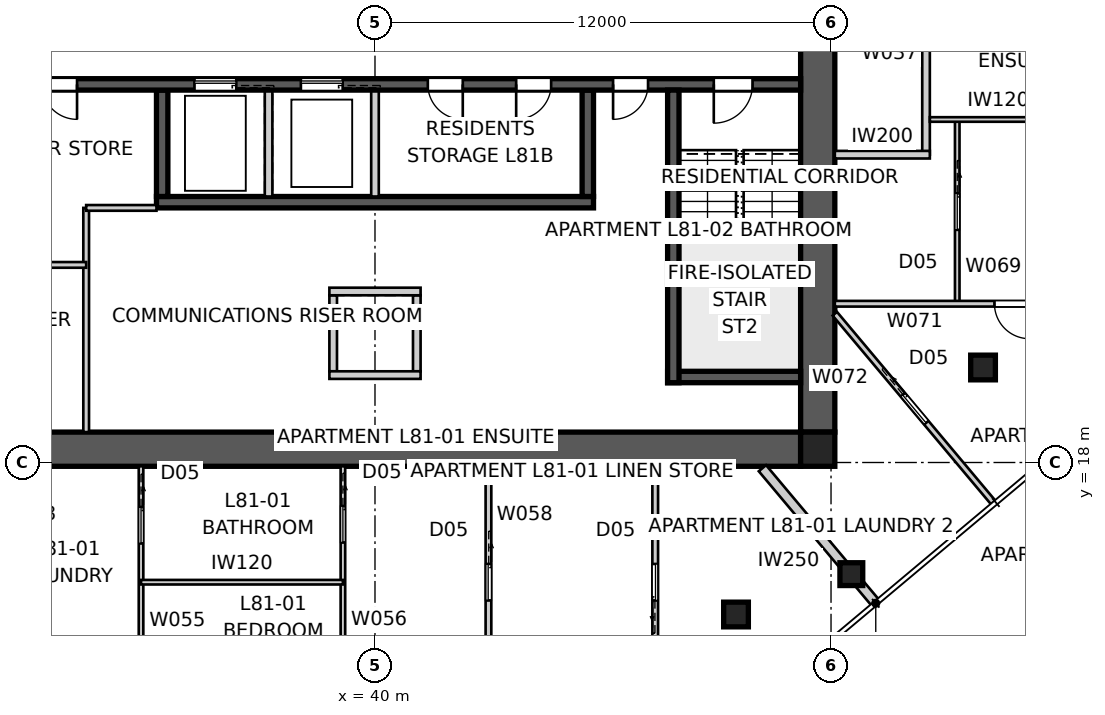
"""IFC4 building model, lengths in metres.
Left out: names, types, materials, properties, quantities, classifications, styles, units other than length and angle.
Written with IfcOpenShell. Run it as: python <this file> out.ifc"""

import sys

from ifc_helpers import new_model, si_unit, direction, frame, frame_2d, origin, origin_2d, place, context, subcontext, project, spatial, polyline, rectangle, outline, extrude, element, fill, save


model = new_model("IFC4")
c1 = context("Model", 3, precision=1e-05, world=origin(), true_north=direction((0.0, 1.0)))
c2 = subcontext(c1, "Body", "Model", "MODEL_VIEW")
j1 = project(units=[si_unit("LENGTHUNIT", "METRE"), si_unit("PLANEANGLEUNIT", "RADIAN")], contexts=[c1])
p1 = place(None, origin())
s1 = spatial("IfcSite", under=j1, at=p1, CompositionType="ELEMENT")
p2 = place(p1, origin())
s2 = spatial("IfcBuilding", under=s1, at=p2, CompositionType="ELEMENT")
p3 = place(p2, frame((0.0, 0.0, 293.0)))
s3 = spatial("IfcBuildingStorey", under=s2, at=p3, CompositionType="ELEMENT", Elevation=293.0)
p4 = place(p3, frame((51.2, 18.35, 0.0), z_axis=(0.0, 0.0, 1.0), x_axis=(-1.0, 0.0, 0.0)))
e1 = element("IfcWall", 1, at=p4, inside=s3, PredefinedType="SHEAR", context=c2, shape_type="SweptSolid", body=[
    extrude(outline(polyline([(0.0, -0.45), (22.4, -0.45), (22.4, -0.025), (22.85, -0.025), (22.85, 0.025), (22.4, 0.025), (22.4, 0.45), (0.0, 0.45), (0.0, 0.025), (-0.45, 0.025), (-0.45, -0.025), (0.0, -0.025), (0.0, -0.45)])), origin(), (0.0, 0.0, 1.0), 3.4),
])
p5 = place(p3, frame((51.65, 18.8, 0.0), z_axis=(0.0, 0.0, 1.0), x_axis=(0.0, 1.0, 0.0)))
e2 = element("IfcWall", 2, at=p5, inside=s3, PredefinedType="SHEAR", context=c2, shape_type="SweptSolid", body=[
    extrude(outline(polyline([(0.0, -0.45), (22.4, -0.45), (22.4, -0.025), (22.85, -0.025), (22.85, 0.025), (22.4, 0.025), (22.4, 0.45), (0.0, 0.45), (0.0, 0.025), (-0.45, 0.025), (-0.45, -0.025), (0.0, -0.025), (0.0, -0.45)])), origin(), (0.0, 0.0, 1.0), 3.4),
])
p6 = place(p5, frame((11.14, 0.0, 0.0)))
e3 = element("IfcOpeningElement", 3, at=p6, cuts=e2, PredefinedType="OPENING", context=c2, shape_type="SweptSolid", body=[
    extrude(rectangle(XDim=1.02, YDim=2.4, at=frame_2d((0.51, 1.2))), frame((0.0, 0.46, 0.0), z_axis=(0.0, -1.0, 0.0), x_axis=(1.0, 0.0, 0.0)), (0.0, 0.0, 1.0), 0.92),
])
p7 = place(p3, frame((51.2, 27.95, 0.0), z_axis=(0.0, 0.0, 1.0), x_axis=(-1.0, 0.0, 0.0)))
e4 = element("IfcWall", 4, at=p7, inside=s3, PredefinedType="SHEAR", context=c2, shape_type="SweptSolid", body=[
    extrude(rectangle(XDim=22.4, YDim=0.3, at=frame_2d((11.2, 0.0))), origin(), (0.0, 0.0, 1.0), 3.4),
])
p8 = place(p7, frame((19.04, 0.0, 0.0)))
e5 = element("IfcOpeningElement", 5, at=p8, cuts=e4, PredefinedType="OPENING", context=c2, shape_type="SweptSolid", body=[
    extrude(rectangle(XDim=0.92, YDim=2.1, at=frame_2d((0.46, 1.05))), frame((0.0, 0.16, 0.0), z_axis=(0.0, -1.0, 0.0), x_axis=(1.0, 0.0, 0.0)), (0.0, 0.0, 1.0), 0.32),
])
p9 = place(p7, frame((1.265, 0.0, 0.0)))
e6 = element("IfcOpeningElement", 6, at=p9, cuts=e4, PredefinedType="OPENING", context=c2, shape_type="SweptSolid", body=[
    extrude(rectangle(XDim=1.02, YDim=2.1, at=frame_2d((0.51, 1.05))), frame((0.0, 0.16, 0.0), z_axis=(0.0, -1.0, 0.0), x_axis=(1.0, 0.0, 0.0)), (0.0, 0.0, 1.0), 0.32),
])
p10 = place(p7, frame((4.015, 0.0, 0.0)))
e7 = element("IfcOpeningElement", 7, at=p10, cuts=e4, PredefinedType="OPENING", context=c2, shape_type="SweptSolid", body=[
    extrude(rectangle(XDim=0.92, YDim=2.1, at=frame_2d((0.46, 1.05))), frame((0.0, 0.16, 0.0), z_axis=(0.0, -1.0, 0.0), x_axis=(1.0, 0.0, 0.0)), (0.0, 0.0, 1.0), 0.32),
])
p11 = place(p7, frame((8.89, 0.0, 0.0)))
e8 = element("IfcOpeningElement", 8, at=p11, cuts=e4, PredefinedType="OPENING", context=c2, shape_type="SweptSolid", body=[
    extrude(rectangle(XDim=0.92, YDim=2.1, at=frame_2d((0.46, 1.05))), frame((0.0, 0.16, 0.0), z_axis=(0.0, -1.0, 0.0), x_axis=(1.0, 0.0, 0.0)), (0.0, 0.0, 1.0), 0.32),
])
p12 = place(p7, frame((6.565, 0.0, 0.0)))
e9 = element("IfcOpeningElement", 9, at=p12, cuts=e4, PredefinedType="OPENING", context=c2, shape_type="SweptSolid", body=[
    extrude(rectangle(XDim=0.92, YDim=2.1, at=frame_2d((0.46, 1.05))), frame((0.0, 0.16, 0.0), z_axis=(0.0, -1.0, 0.0), x_axis=(1.0, 0.0, 0.0)), (0.0, 0.0, 1.0), 0.32),
])
p13 = place(p7, frame((12.05, 0.0, 0.0)))
e10 = element("IfcOpeningElement", 10, at=p13, cuts=e4, PredefinedType="OPENING", context=c2, shape_type="SweptSolid", body=[
    extrude(rectangle(XDim=1.1, YDim=2.1, at=frame_2d((0.55, 1.05))), frame((0.0, 0.16, 0.0), z_axis=(0.0, -1.0, 0.0), x_axis=(1.0, 0.0, 0.0)), (0.0, 0.0, 1.0), 0.32),
])
p14 = place(p7, frame((14.85, 0.0, 0.0)))
e11 = element("IfcOpeningElement", 11, at=p14, cuts=e4, PredefinedType="OPENING", context=c2, shape_type="SweptSolid", body=[
    extrude(rectangle(XDim=1.1, YDim=2.1, at=frame_2d((0.55, 1.05))), frame((0.0, 0.16, 0.0), z_axis=(0.0, -1.0, 0.0), x_axis=(1.0, 0.0, 0.0)), (0.0, 0.0, 1.0), 0.32),
])
p15 = place(p3, frame((45.75, 24.85, 0.0), z_axis=(0.0, 0.0, 1.0), x_axis=(-1.0, 0.0, 0.0)))
e12 = element("IfcWall", 12, at=p15, inside=s3, PredefinedType="SHEAR", context=c2, shape_type="SweptSolid", body=[
    extrude(rectangle(XDim=11.5, YDim=0.3, at=frame_2d((5.75, 0.0))), origin(), (0.0, 0.0, 1.0), 3.4),
])
p16 = place(p3, frame((45.6, 27.8, 0.0), z_axis=(0.0, 0.0, 1.0), x_axis=(0.0, -1.0, 0.0)))
e13 = element("IfcWall", 13, at=p16, inside=s3, PredefinedType="SHEAR", context=c2, shape_type="SweptSolid", body=[
    extrude(rectangle(XDim=2.8, YDim=0.3, at=frame_2d((1.4, 0.0))), origin(), (0.0, 0.0, 1.0), 3.4),
])
for number, where, z_axis, x_axis in (
    (14, (40.0, 27.8, 0.0), (0.0, 0.0, 1.0), (0.0, -1.0, 0.0)),
    (15, (37.2, 27.8, 0.0), (0.0, 0.0, 1.0), (0.0, -1.0, 0.0)),
):
    element("IfcWall", number, at=place(p3, frame(where, z_axis=z_axis, x_axis=x_axis)), inside=s3, PredefinedType="SOLIDWALL", context=c2, shape_type="SweptSolid", body=[
        extrude(rectangle(XDim=2.8, YDim=0.2, at=frame_2d((1.4, 0.0))), origin(), (0.0, 0.0, 1.0), 3.4),
    ])
p17 = place(p3, frame((34.4, 27.8, 0.0), z_axis=(0.0, 0.0, 1.0), x_axis=(0.0, -1.0, 0.0)))
e16 = element("IfcWall", 16, at=p17, inside=s3, PredefinedType="SHEAR", context=c2, shape_type="SweptSolid", body=[
    extrude(rectangle(XDim=2.8, YDim=0.3, at=frame_2d((1.4, 0.0))), origin(), (0.0, 0.0, 1.0), 3.4),
])
p18 = place(p3, frame((47.85, 27.8, 0.0), z_axis=(0.0, 0.0, 1.0), x_axis=(0.0, -1.0, 0.0)))
e17 = element("IfcWall", 17, at=p18, inside=s3, PredefinedType="SHEAR", context=c2, shape_type="SweptSolid", body=[
    extrude(rectangle(XDim=7.7, YDim=0.3, at=frame_2d((3.85, 0.0))), origin(), (0.0, 0.0, 1.0), 3.4),
])
p19 = place(p3, frame((51.2, 20.25, 0.0), z_axis=(0.0, 0.0, 1.0), x_axis=(-1.0, 0.0, 0.0)))
e18 = element("IfcWall", 18, at=p19, inside=s3, PredefinedType="SHEAR", context=c2, shape_type="SweptSolid", body=[
    extrude(rectangle(XDim=3.5, YDim=0.3, at=frame_2d((1.75, 0.0))), origin(), (0.0, 0.0, 1.0), 3.4),
])
for number, where, z_axis, x_axis in (
    (19, (38.9, 22.4, 0.0), (0.0, 0.0, 1.0), (0.0, -1.0, 0.0)),
    (20, (41.1, 22.4, 0.0), (0.0, 0.0, 1.0), (0.0, -1.0, 0.0)),
):
    element("IfcWall", number, at=place(p3, frame(where, z_axis=z_axis, x_axis=x_axis)), inside=s3, PredefinedType="SOLIDWALL", context=c2, shape_type="SweptSolid", body=[
        extrude(rectangle(XDim=2.0, YDim=0.2, at=frame_2d((1.0, 0.0))), origin(), (0.0, 0.0, 1.0), 3.4),
    ])
for number, where, z_axis, x_axis in (
    (21, (38.8, 22.5, 0.0), (0.0, 0.0, 1.0), (1.0, 0.0, 0.0)),
    (22, (38.8, 20.3, 0.0), (0.0, 0.0, 1.0), (1.0, 0.0, 0.0)),
):
    element("IfcWall", number, at=place(p3, frame(where, z_axis=z_axis, x_axis=x_axis)), inside=s3, PredefinedType="SOLIDWALL", context=c2, shape_type="SweptSolid", body=[
        extrude(rectangle(XDim=2.4, YDim=0.2, at=frame_2d((1.2, 0.0))), origin(), (0.0, 0.0, 1.0), 3.4),
    ])
p20 = place(p3, frame((51.65, 18.35, 0.0), z_axis=(0.0, 0.0, 1.0), x_axis=(1.0, 0.0, 0.0)))
e23 = element("IfcColumn", 23, at=p20, inside=s3, PredefinedType="COLUMN", context=c2, shape_type="SweptSolid", body=[
    extrude(rectangle(XDim=0.9, YDim=0.9, at=origin_2d()), origin(), (0.0, 0.0, 1.0), 3.4),
])
p21 = place(p3, frame((52.534, 15.062, 0.0), z_axis=(0.0, 0.0, 1.0), x_axis=(1.0, 0.0, 0.0)))
e24 = element("IfcColumn", 24, at=p21, inside=s3, PredefinedType="COLUMN", context=c2, shape_type="SweptSolid", body=[
    extrude(rectangle(XDim=0.6, YDim=0.6, at=origin_2d()), origin(), (0.0, 0.0, 1.0), 3.4),
])
for number, where, z_axis, x_axis in (
    (25, (49.5, 14.0, 0.0), (0.0, 0.0, 1.0), (1.0, 0.0, 0.0)),
    (26, (56.0, 20.5, 0.0), (0.0, 0.0, 1.0), (1.0, 0.0, 0.0)),
):
    element("IfcColumn", number, at=place(p3, frame(where, z_axis=z_axis, x_axis=x_axis)), inside=s3, PredefinedType="COLUMN", context=c2, shape_type="SweptSolid", body=[
        extrude(rectangle(XDim=0.65, YDim=0.65, at=origin_2d()), origin(), (0.0, 0.0, 1.0), 3.4),
    ])
p22 = place(p3, frame((54.5, 26.1, 0.0), z_axis=(0.0, 0.0, 1.0), x_axis=(0.0, 1.0, 0.0)))
e27 = element("IfcWall", 27, at=p22, inside=s3, PredefinedType="PARTITIONING", context=c2, shape_type="SweptSolid", body=[
    extrude(rectangle(XDim=7.8, YDim=0.2, at=frame_2d((3.9, 0.0))), origin(), (0.0, 0.0, 1.0), 3.25),
])
p23 = place(p22, frame((5.302, 0.0, 0.0)))
e28 = element("IfcOpeningElement", 28, at=p23, cuts=e27, PredefinedType="OPENING", context=c2, shape_type="SweptSolid", body=[
    extrude(rectangle(XDim=1.02, YDim=2.34, at=frame_2d((0.51, 1.17))), frame((0.0, 0.11, 0.0), z_axis=(0.0, -1.0, 0.0), x_axis=(1.0, 0.0, 0.0)), (0.0, 0.0, 1.0), 0.22),
])
p24 = place(p3, frame((52.1, 26.1, 0.0), z_axis=(0.0, 0.0, 1.0), x_axis=(1.0, 0.0, 0.0)))
e29 = element("IfcWall", 29, at=p24, inside=s3, PredefinedType="PARTITIONING", context=c2, shape_type="SweptSolid", body=[
    extrude(rectangle(XDim=2.5, YDim=0.2, at=frame_2d((1.25, 0.0))), origin(), (0.0, 0.0, 1.0), 3.25),
])
p25 = place(p3, frame((53.177, 14.296, 0.0), z_axis=(0.0, 0.0, 1.0), x_axis=(-0.64279957712, 0.76603440109, 0.0)))
e30 = element("IfcWall", 30, at=p25, inside=s3, PredefinedType="PARTITIONING", context=c2, shape_type="SweptSolid", body=[
    extrude(rectangle(XDim=4.64, YDim=0.25, at=frame_2d((2.32, 0.0))), origin(), (0.0, 0.0, 1.0), 3.25),
])
p26 = place(p3, frame((32.4, 18.8, 0.0), z_axis=(0.0, 0.0, 1.0), x_axis=(0.0, 1.0, 0.0)))
e31 = element("IfcWall", 31, at=p26, inside=s3, PredefinedType="SOLIDWALL", context=c2, shape_type="SweptSolid", body=[
    extrude(rectangle(XDim=5.9, YDim=0.15, at=frame_2d((2.95, 0.0))), origin(), (0.0, 0.0, 1.0), 3.25),
])
p27 = place(p3, frame((32.4, 24.7, 0.0), z_axis=(0.0, 0.0, 1.0), x_axis=(1.0, 0.0, 0.0)))
e32 = element("IfcWall", 32, at=p27, inside=s3, PredefinedType="SOLIDWALL", context=c2, shape_type="SweptSolid", body=[
    extrude(rectangle(XDim=1.85, YDim=0.15, at=frame_2d((0.925, 0.0))), origin(), (0.0, 0.0, 1.0), 3.25),
])
p28 = place(p3, frame((32.4, 23.2, 0.0), z_axis=(0.0, 0.0, 1.0), x_axis=(-1.0, 0.0, 0.0)))
e33 = element("IfcWall", 33, at=p28, inside=s3, PredefinedType="SOLIDWALL", context=c2, shape_type="SweptSolid", body=[
    extrude(rectangle(XDim=3.6, YDim=0.15, at=frame_2d((1.8, 0.0))), origin(), (0.0, 0.0, 1.0), 3.25),
])
p29 = place(p28, frame((1.34, 0.0, 0.0)))
e34 = element("IfcOpeningElement", 34, at=p29, cuts=e33, PredefinedType="OPENING", context=c2, shape_type="SweptSolid", body=[
    extrude(rectangle(XDim=0.92, YDim=2.1, at=frame_2d((0.46, 1.05))), frame((0.0, 0.085, 0.0), z_axis=(0.0, -1.0, 0.0), x_axis=(1.0, 0.0, 0.0)), (0.0, 0.0, 1.0), 0.17),
])
p30 = place(p3, frame((33.844, 17.9, 0.0), z_axis=(0.0, 0.0, 1.0), x_axis=(0.0, -1.0, 0.0)))
e35 = element("IfcWall", 35, at=p30, inside=s3, PredefinedType="PARTITIONING", context=c2, shape_type="SweptSolid", body=[
    extrude(rectangle(XDim=6.1, YDim=0.12, at=frame_2d((3.05, 0.0))), origin(), (0.0, 0.0, 1.0), 3.25),
])
p31 = place(p30, frame((1.07, 0.0, 0.0)))
e36 = element("IfcOpeningElement", 36, at=p31, cuts=e35, PredefinedType="OPENING", context=c2, shape_type="SweptSolid", body=[
    extrude(rectangle(XDim=0.96, YDim=2.1, at=frame_2d((0.48, 1.05))), frame((0.0, 0.07, 0.0), z_axis=(0.0, -1.0, 0.0), x_axis=(1.0, 0.0, 0.0)), (0.0, 0.0, 1.0), 0.14),
])
p32 = place(p3, frame((39.156, 17.9, 0.0), z_axis=(0.0, 0.0, 1.0), x_axis=(0.0, -1.0, 0.0)))
e37 = element("IfcWall", 37, at=p32, inside=s3, PredefinedType="PARTITIONING", context=c2, shape_type="SweptSolid", body=[
    extrude(rectangle(XDim=6.1, YDim=0.12, at=frame_2d((3.05, 0.0))), origin(), (0.0, 0.0, 1.0), 3.25),
])
p33 = place(p32, frame((1.045, 0.0, 0.0)))
e38 = element("IfcOpeningElement", 38, at=p33, cuts=e37, PredefinedType="OPENING", context=c2, shape_type="SweptSolid", body=[
    extrude(rectangle(XDim=0.96, YDim=2.1, at=frame_2d((0.48, 1.05))), frame((0.0, 0.07, 0.0), z_axis=(0.0, -1.0, 0.0), x_axis=(1.0, 0.0, 0.0)), (0.0, 0.0, 1.0), 0.14),
])
p34 = place(p3, frame((39.156, 14.85, 0.0), z_axis=(0.0, 0.0, 1.0), x_axis=(-1.0, 0.0, 0.0)))
e39 = element("IfcWall", 39, at=p34, inside=s3, PredefinedType="PARTITIONING", context=c2, shape_type="SweptSolid", body=[
    extrude(rectangle(XDim=5.312, YDim=0.12, at=frame_2d((2.656, 0.0))), origin(), (0.0, 0.0, 1.0), 3.25),
])
p35 = place(p3, frame((42.986, 17.9, 0.0), z_axis=(0.0, 0.0, 1.0), x_axis=(0.0, -1.0, 0.0)))
e40 = element("IfcWall", 40, at=p35, inside=s3, PredefinedType="SOLIDWALL", context=c2, shape_type="SweptSolid", body=[
    extrude(rectangle(XDim=5.4, YDim=0.15, at=frame_2d((2.7, 0.0))), origin(), (0.0, 0.0, 1.0), 2.796),
])
p36 = place(p35, frame((2.57, 0.0, 0.0)))
e41 = element("IfcOpeningElement", 41, at=p36, cuts=e40, PredefinedType="OPENING", context=c2, shape_type="SweptSolid", body=[
    extrude(rectangle(XDim=0.96, YDim=2.1, at=frame_2d((0.48, 1.05))), frame((0.0, 0.085, 0.0), z_axis=(0.0, -1.0, 0.0), x_axis=(1.0, 0.0, 0.0)), (0.0, 0.0, 1.0), 0.17),
])
p37 = place(p3, frame((47.374, 11.8, 0.0), z_axis=(0.0, 0.0, 1.0), x_axis=(0.0, 1.0, 0.0)))
e42 = element("IfcWall", 42, at=p37, inside=s3, PredefinedType="SOLIDWALL", context=c2, shape_type="SweptSolid", body=[
    extrude(rectangle(XDim=6.1, YDim=0.15, at=frame_2d((3.05, 0.0))), origin(), (0.0, 0.0, 1.0), 3.25),
])
p38 = place(p37, frame((2.57, 0.0, 0.0)))
e43 = element("IfcOpeningElement", 43, at=p38, cuts=e42, PredefinedType="OPENING", context=c2, shape_type="SweptSolid", body=[
    extrude(rectangle(XDim=0.96, YDim=2.1, at=frame_2d((0.48, 1.05))), frame((0.0, 0.085, 0.0), z_axis=(0.0, -1.0, 0.0), x_axis=(1.0, 0.0, 0.0)), (0.0, 0.0, 1.0), 0.17),
])
p39 = place(p3, frame((55.321, 27.027, 0.0), z_axis=(0.0, 0.0, 1.0), x_axis=(0.0, -1.0, 0.0)))
e44 = element("IfcWall", 44, at=p39, inside=s3, PredefinedType="PARTITIONING", context=c2, shape_type="SweptSolid", body=[
    extrude(rectangle(XDim=4.849, YDim=0.12, at=frame_2d((2.424, 0.0))), origin(), (0.0, 0.0, 1.0), 3.25),
])
p40 = place(p39, frame((1.944, 0.0, 0.0)))
e45 = element("IfcOpeningElement", 45, at=p40, cuts=e44, PredefinedType="OPENING", context=c2, shape_type="SweptSolid", body=[
    extrude(rectangle(XDim=0.96, YDim=2.1, at=frame_2d((0.48, 1.05))), frame((0.0, 0.07, 0.0), z_axis=(0.0, -1.0, 0.0), x_axis=(1.0, 0.0, 0.0)), (0.0, 0.0, 1.0), 0.14),
])
p41 = place(p3, frame((54.6, 27.027, 0.0), z_axis=(0.0, 0.0, 1.0), x_axis=(1.0, 0.0, 0.0)))
e46 = element("IfcWall", 46, at=p41, inside=s3, PredefinedType="PARTITIONING", context=c2, shape_type="SweptSolid", body=[
    extrude(rectangle(XDim=3.6, YDim=0.12, at=frame_2d((1.8, 0.0))), origin(), (0.0, 0.0, 1.0), 2.796),
])
p42 = place(p3, frame((58.2, 22.178, 0.0), z_axis=(0.0, 0.0, 1.0), x_axis=(-1.0, 0.0, 0.0)))
e47 = element("IfcWall", 47, at=p42, inside=s3, PredefinedType="SOLIDWALL", context=c2, shape_type="SweptSolid", body=[
    extrude(rectangle(XDim=6.1, YDim=0.15, at=frame_2d((3.05, 0.0))), origin(), (0.0, 0.0, 1.0), 3.25),
])
p43 = place(p42, frame((0.979, 0.0, 0.0)))
e48 = element("IfcOpeningElement", 48, at=p43, cuts=e47, PredefinedType="OPENING", context=c2, shape_type="SweptSolid", body=[
    extrude(rectangle(XDim=0.92, YDim=2.34, at=frame_2d((0.46, 1.17))), frame((0.0, 0.085, 0.0), z_axis=(0.0, -1.0, 0.0), x_axis=(1.0, 0.0, 0.0)), (0.0, 0.0, 1.0), 0.17),
])
p44 = place(p3, frame((52.1, 21.915, 0.0), z_axis=(0.0, 0.0, 1.0), x_axis=(0.642782544614, -0.766048693191, 0.0)))
e49 = element("IfcWall", 49, at=p44, inside=s3, PredefinedType="SOLIDWALL", context=c2, shape_type="SweptSolid", body=[
    extrude(rectangle(XDim=6.489, YDim=0.15, at=frame_2d((3.244, 0.0))), origin(), (0.0, 0.0, 1.0), 3.25),
])
p45 = place(p44, frame((2.784, 0.0, 0.0)))
e50 = element("IfcOpeningElement", 50, at=p45, cuts=e49, PredefinedType="OPENING", context=c2, shape_type="SweptSolid", body=[
    extrude(rectangle(XDim=0.96, YDim=2.1, at=frame_2d((0.48, 1.05))), frame((0.0, 0.085, 0.0), z_axis=(0.0, -1.0, 0.0), x_axis=(1.0, 0.0, 0.0)), (0.0, 0.0, 1.0), 0.17),
])
p46 = place(p8, origin())
e51 = element("IfcDoor", 51, at=p46, inside=s3, OperationType="SINGLE_SWING_LEFT", PredefinedType="DOOR", context=c2, shape_type="SweptSolid", body=[
    extrude(rectangle(XDim=0.92, YDim=2.1, at=frame_2d((0.46, 1.05))), frame((0.0, 0.025, 0.0), z_axis=(0.0, -1.0, 0.0), x_axis=(1.0, 0.0, 0.0)), (0.0, 0.0, 1.0), 0.05),
])
fill(e5, e51)
p47 = place(p9, origin())
e52 = element("IfcDoor", 52, at=p47, inside=s3, OperationType="SINGLE_SWING_RIGHT", PredefinedType="DOOR", context=c2, shape_type="SweptSolid", body=[
    extrude(rectangle(XDim=1.02, YDim=2.1, at=frame_2d((0.51, 1.05))), frame((0.0, 0.025, 0.0), z_axis=(0.0, -1.0, 0.0), x_axis=(1.0, 0.0, 0.0)), (0.0, 0.0, 1.0), 0.05),
])
fill(e6, e52)
p48 = place(p10, origin())
e53 = element("IfcDoor", 53, at=p48, inside=s3, OperationType="SINGLE_SWING_RIGHT", PredefinedType="DOOR", context=c2, shape_type="SweptSolid", body=[
    extrude(rectangle(XDim=0.92, YDim=2.1, at=frame_2d((0.46, 1.05))), frame((0.0, 0.025, 0.0), z_axis=(0.0, -1.0, 0.0), x_axis=(1.0, 0.0, 0.0)), (0.0, 0.0, 1.0), 0.05),
])
fill(e7, e53)
p49 = place(p40, origin())
e54 = element("IfcDoor", 54, at=p49, inside=s3, OperationType="SLIDING_TO_LEFT", PredefinedType="DOOR", context=c2, shape_type="SweptSolid", body=[
    extrude(rectangle(XDim=0.96, YDim=2.1, at=frame_2d((0.48, 1.05))), frame((0.0, 0.025, 0.0), z_axis=(0.0, -1.0, 0.0), x_axis=(1.0, 0.0, 0.0)), (0.0, 0.0, 1.0), 0.05),
])
fill(e45, e54)
p50 = place(p43, origin())
e55 = element("IfcDoor", 55, at=p50, inside=s3, OperationType="SINGLE_SWING_LEFT", PredefinedType="DOOR", context=c2, shape_type="SweptSolid", body=[
    extrude(rectangle(XDim=0.92, YDim=2.34, at=frame_2d((0.46, 1.17))), frame((0.0, 0.025, 0.0), z_axis=(0.0, -1.0, 0.0), x_axis=(1.0, 0.0, 0.0)), (0.0, 0.0, 1.0), 0.05),
])
fill(e48, e55)
p51 = place(p45, origin())
e56 = element("IfcDoor", 56, at=p51, inside=s3, OperationType="SLIDING_TO_LEFT", PredefinedType="DOOR", context=c2, shape_type="SweptSolid", body=[
    extrude(rectangle(XDim=0.96, YDim=2.1, at=frame_2d((0.48, 1.05))), frame((0.0, 0.025, 0.0), z_axis=(0.0, -1.0, 0.0), x_axis=(1.0, 0.0, 0.0)), (0.0, 0.0, 1.0), 0.05),
])
fill(e50, e56)
p52 = place(p31, origin())
e57 = element("IfcDoor", 57, at=p52, inside=s3, OperationType="SLIDING_TO_LEFT", PredefinedType="DOOR", context=c2, shape_type="SweptSolid", body=[
    extrude(rectangle(XDim=0.96, YDim=2.1, at=frame_2d((0.48, 1.05))), frame((0.0, 0.025, 0.0), z_axis=(0.0, -1.0, 0.0), x_axis=(1.0, 0.0, 0.0)), (0.0, 0.0, 1.0), 0.05),
])
fill(e36, e57)
p53 = place(p33, origin())
e58 = element("IfcDoor", 58, at=p53, inside=s3, OperationType="SLIDING_TO_LEFT", PredefinedType="DOOR", context=c2, shape_type="SweptSolid", body=[
    extrude(rectangle(XDim=0.96, YDim=2.1, at=frame_2d((0.48, 1.05))), frame((0.0, 0.025, 0.0), z_axis=(0.0, -1.0, 0.0), x_axis=(1.0, 0.0, 0.0)), (0.0, 0.0, 1.0), 0.05),
])
fill(e38, e58)
p54 = place(p36, origin())
e59 = element("IfcDoor", 59, at=p54, inside=s3, OperationType="SLIDING_TO_LEFT", PredefinedType="DOOR", context=c2, shape_type="SweptSolid", body=[
    extrude(rectangle(XDim=0.96, YDim=2.1, at=frame_2d((0.48, 1.05))), frame((0.0, 0.025, 0.0), z_axis=(0.0, -1.0, 0.0), x_axis=(1.0, 0.0, 0.0)), (0.0, 0.0, 1.0), 0.05),
])
fill(e41, e59)
p55 = place(p38, origin())
e60 = element("IfcDoor", 60, at=p55, inside=s3, OperationType="SLIDING_TO_LEFT", PredefinedType="DOOR", context=c2, shape_type="SweptSolid", body=[
    extrude(rectangle(XDim=0.96, YDim=2.1, at=frame_2d((0.48, 1.05))), frame((0.0, 0.025, 0.0), z_axis=(0.0, -1.0, 0.0), x_axis=(1.0, 0.0, 0.0)), (0.0, 0.0, 1.0), 0.05),
])
fill(e43, e60)
p56 = place(p11, origin())
e61 = element("IfcDoor", 61, at=p56, inside=s3, OperationType="SINGLE_SWING_LEFT", PredefinedType="DOOR", context=c2, shape_type="SweptSolid", body=[
    extrude(rectangle(XDim=0.92, YDim=2.1, at=frame_2d((0.46, 1.05))), frame((0.0, 0.025, 0.0), z_axis=(0.0, -1.0, 0.0), x_axis=(1.0, 0.0, 0.0)), (0.0, 0.0, 1.0), 0.05),
])
fill(e8, e61)
p57 = place(p12, origin())
e62 = element("IfcDoor", 62, at=p57, inside=s3, OperationType="SINGLE_SWING_RIGHT", PredefinedType="DOOR", context=c2, shape_type="SweptSolid", body=[
    extrude(rectangle(XDim=0.92, YDim=2.1, at=frame_2d((0.46, 1.05))), frame((0.0, 0.025, 0.0), z_axis=(0.0, -1.0, 0.0), x_axis=(1.0, 0.0, 0.0)), (0.0, 0.0, 1.0), 0.05),
])
fill(e9, e62)
p58 = place(p13, origin())
e63 = element("IfcDoor", 63, at=p58, inside=s3, OperationType="SLIDING_TO_LEFT", PredefinedType="DOOR", context=c2, shape_type="SweptSolid", body=[
    extrude(rectangle(XDim=1.1, YDim=2.1, at=frame_2d((0.55, 1.05))), frame((0.0, 0.025, 0.0), z_axis=(0.0, -1.0, 0.0), x_axis=(1.0, 0.0, 0.0)), (0.0, 0.0, 1.0), 0.05),
])
fill(e10, e63)
p59 = place(p14, origin())
e64 = element("IfcDoor", 64, at=p59, inside=s3, OperationType="SLIDING_TO_LEFT", PredefinedType="DOOR", context=c2, shape_type="SweptSolid", body=[
    extrude(rectangle(XDim=1.1, YDim=2.1, at=frame_2d((0.55, 1.05))), frame((0.0, 0.025, 0.0), z_axis=(0.0, -1.0, 0.0), x_axis=(1.0, 0.0, 0.0)), (0.0, 0.0, 1.0), 0.05),
])
fill(e11, e64)
save(model, sys.argv[1])
